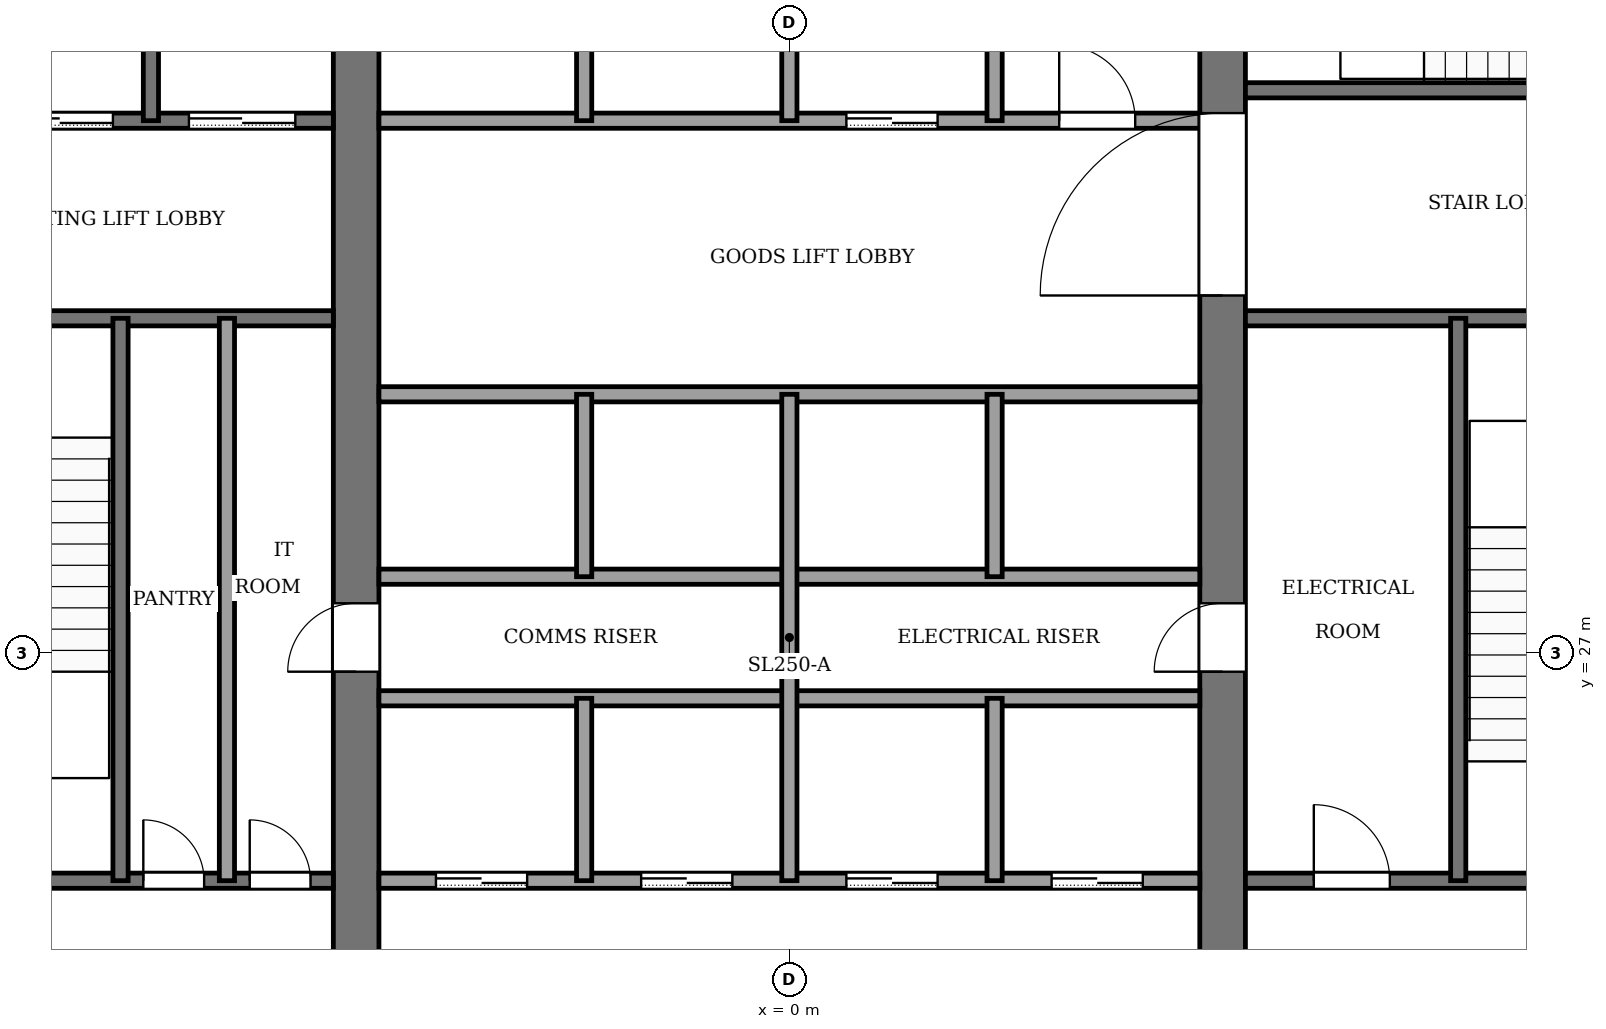
"""IFC4 building model, lengths in metres.
Left out: names, types, materials, properties, quantities, classifications, styles, units other than length and angle.
Written with IfcOpenShell. Run it as: python <this file> out.ifc"""

import sys

from ifc_helpers import new_model, si_unit, direction, frame, frame_2d, origin, place, context, subcontext, project, spatial, rectangle, extrude, element, fill, save


model = new_model("IFC4")
c1 = context("Model", 3, precision=1e-05, world=origin(), true_north=direction((0.0, 1.0)))
c2 = subcontext(c1, "Body", "Model", "MODEL_VIEW")
j1 = project(units=[si_unit("LENGTHUNIT", "METRE"), si_unit("PLANEANGLEUNIT", "RADIAN")], contexts=[c1])
p1 = place(None, origin())
s1 = spatial("IfcSite", under=j1, at=p1, CompositionType="ELEMENT")
p2 = place(p1, origin())
s2 = spatial("IfcBuilding", under=s1, at=p2, CompositionType="ELEMENT")
p3 = place(p2, frame((0.0, 0.0, 22.0)))
s3 = spatial("IfcBuildingStorey", under=s2, at=p3, CompositionType="ELEMENT", Elevation=22.0)
p4 = place(p3, frame((-5.7, 18.4, -0.13), z_axis=(0.0, 0.0, 1.0), x_axis=(0.0, 1.0, 0.0)))
e1 = element("IfcWall", 1, at=p4, inside=s3, PredefinedType="SHEAR", context=c2, shape_type="SweptSolid", body=[
    extrude(rectangle(XDim=19.2, YDim=0.6, at=frame_2d((9.6, 0.0))), origin(), (0.0, 0.0, 1.0), 4.0),
])
p5 = place(p4, frame((8.35, 0.0, 0.13)))
e2 = element("IfcOpeningElement", 2, at=p5, cuts=e1, PredefinedType="OPENING", context=c2, shape_type="SweptSolid", body=[
    extrude(rectangle(XDim=0.9, YDim=2.1, at=frame_2d((0.45, 1.05))), frame((0.0, 0.31, 0.0), z_axis=(0.0, -1.0, 0.0), x_axis=(1.0, 0.0, 0.0)), (0.0, 0.0, 1.0), 0.62),
])
p6 = place(p3, frame((5.7, 18.4, -0.13), z_axis=(0.0, 0.0, 1.0), x_axis=(0.0, 1.0, 0.0)))
e3 = element("IfcWall", 3, at=p6, inside=s3, PredefinedType="SHEAR", context=c2, shape_type="SweptSolid", body=[
    extrude(rectangle(XDim=19.2, YDim=0.6, at=frame_2d((9.6, 0.0))), origin(), (0.0, 0.0, 1.0), 4.0),
])
p7 = place(p6, frame((8.35, 0.0, 0.13)))
e4 = element("IfcOpeningElement", 4, at=p7, cuts=e3, PredefinedType="OPENING", context=c2, shape_type="SweptSolid", body=[
    extrude(rectangle(XDim=0.9, YDim=2.1, at=frame_2d((0.45, 1.05))), frame((0.0, 0.31, 0.0), z_axis=(0.0, -1.0, 0.0), x_axis=(1.0, 0.0, 0.0)), (0.0, 0.0, 1.0), 0.62),
])
p8 = place(p6, frame((13.3, 0.0, 0.13)))
e5 = element("IfcOpeningElement", 5, at=p8, cuts=e3, PredefinedType="OPENING", context=c2, shape_type="SweptSolid", body=[
    extrude(rectangle(XDim=2.4, YDim=2.4, at=frame_2d((1.2, 1.2))), frame((0.0, 0.31, 0.0), z_axis=(0.0, -1.0, 0.0), x_axis=(1.0, 0.0, 0.0)), (0.0, 0.0, 1.0), 0.62),
])
p9 = place(p3, frame((-12.6, 24.0, 0.0), z_axis=(0.0, 0.0, 1.0), x_axis=(1.0, 0.0, 0.0)))
e6 = element("IfcWall", 6, at=p9, inside=s3, PredefinedType="PARTITIONING", context=c2, shape_type="SweptSolid", body=[
    extrude(rectangle(XDim=6.6, YDim=0.2, at=frame_2d((3.3, 0.0))), origin(), (0.0, 0.0, 1.0), 3.87),
])
p10 = place(p9, frame((4.1, 0.0, 0.0)))
e7 = element("IfcOpeningElement", 7, at=p10, cuts=e6, PredefinedType="OPENING", context=c2, shape_type="SweptSolid", body=[
    extrude(rectangle(XDim=0.8, YDim=2.1, at=frame_2d((0.4, 1.05))), frame((0.0, 0.11, 0.0), z_axis=(0.0, -1.0, 0.0), x_axis=(1.0, 0.0, 0.0)), (0.0, 0.0, 1.0), 0.22),
])
p11 = place(p9, frame((5.5, 0.0, 0.0)))
e8 = element("IfcOpeningElement", 8, at=p11, cuts=e6, PredefinedType="OPENING", context=c2, shape_type="SweptSolid", body=[
    extrude(rectangle(XDim=0.8, YDim=2.1, at=frame_2d((0.4, 1.05))), frame((0.0, 0.11, 0.0), z_axis=(0.0, -1.0, 0.0), x_axis=(1.0, 0.0, 0.0)), (0.0, 0.0, 1.0), 0.22),
])
p12 = place(p3, frame((-5.4, 24.0, 0.0), z_axis=(0.0, 0.0, 1.0), x_axis=(1.0, 0.0, 0.0)))
e9 = element("IfcWall", 9, at=p12, inside=s3, PredefinedType="PARTITIONING", context=c2, shape_type="SweptSolid", body=[
    extrude(rectangle(XDim=10.8, YDim=0.2, at=frame_2d((5.4, 0.0))), origin(), (0.0, 0.0, 1.0), 3.87),
])
p13 = place(p12, frame((0.75, 0.0, 0.0)))
e10 = element("IfcOpeningElement", 10, at=p13, cuts=e9, PredefinedType="OPENING", context=c2, shape_type="SweptSolid", body=[
    extrude(rectangle(XDim=1.2, YDim=2.2, at=frame_2d((0.6, 1.1))), frame((0.0, 0.11, 0.0), z_axis=(0.0, -1.0, 0.0), x_axis=(1.0, 0.0, 0.0)), (0.0, 0.0, 1.0), 0.22),
])
p14 = place(p12, frame((3.45, 0.0, 0.0)))
e11 = element("IfcOpeningElement", 11, at=p14, cuts=e9, PredefinedType="OPENING", context=c2, shape_type="SweptSolid", body=[
    extrude(rectangle(XDim=1.2, YDim=2.2, at=frame_2d((0.6, 1.1))), frame((0.0, 0.11, 0.0), z_axis=(0.0, -1.0, 0.0), x_axis=(1.0, 0.0, 0.0)), (0.0, 0.0, 1.0), 0.22),
])
p15 = place(p12, frame((6.15, 0.0, 0.0)))
e12 = element("IfcOpeningElement", 12, at=p15, cuts=e9, PredefinedType="OPENING", context=c2, shape_type="SweptSolid", body=[
    extrude(rectangle(XDim=1.2, YDim=2.2, at=frame_2d((0.6, 1.1))), frame((0.0, 0.11, 0.0), z_axis=(0.0, -1.0, 0.0), x_axis=(1.0, 0.0, 0.0)), (0.0, 0.0, 1.0), 0.22),
])
p16 = place(p12, frame((8.85, 0.0, 0.0)))
e13 = element("IfcOpeningElement", 13, at=p16, cuts=e9, PredefinedType="OPENING", context=c2, shape_type="SweptSolid", body=[
    extrude(rectangle(XDim=1.2, YDim=2.2, at=frame_2d((0.6, 1.1))), frame((0.0, 0.11, 0.0), z_axis=(0.0, -1.0, 0.0), x_axis=(1.0, 0.0, 0.0)), (0.0, 0.0, 1.0), 0.22),
])
p17 = place(p3, frame((6.0, 24.0, 0.0), z_axis=(0.0, 0.0, 1.0), x_axis=(1.0, 0.0, 0.0)))
e14 = element("IfcWall", 14, at=p17, inside=s3, PredefinedType="PARTITIONING", context=c2, shape_type="SweptSolid", body=[
    extrude(rectangle(XDim=6.6, YDim=0.2, at=frame_2d((3.3, 0.0))), origin(), (0.0, 0.0, 1.0), 3.87),
])
p18 = place(p17, frame((0.9, 0.0, 0.0)))
e15 = element("IfcOpeningElement", 15, at=p18, cuts=e14, PredefinedType="OPENING", context=c2, shape_type="SweptSolid", body=[
    extrude(rectangle(XDim=1.0, YDim=2.1, at=frame_2d((0.5, 1.05))), frame((0.0, 0.11, 0.0), z_axis=(0.0, -1.0, 0.0), x_axis=(1.0, 0.0, 0.0)), (0.0, 0.0, 1.0), 0.22),
])
p19 = place(p17, frame((4.4, 0.0, 0.0)))
e16 = element("IfcOpeningElement", 16, at=p19, cuts=e14, PredefinedType="OPENING", context=c2, shape_type="SweptSolid", body=[
    extrude(rectangle(XDim=1.2, YDim=2.2, at=frame_2d((0.6, 1.1))), frame((0.0, 0.11, 0.0), z_axis=(0.0, -1.0, 0.0), x_axis=(1.0, 0.0, 0.0)), (0.0, 0.0, 1.0), 0.22),
])
for number, where, z_axis, x_axis in (
    (17, (-5.4, 26.4, 0.0), (0.0, 0.0, 1.0), (1.0, 0.0, 0.0)),
    (18, (-5.4, 28.0, 0.0), (0.0, 0.0, 1.0), (1.0, 0.0, 0.0)),
    (19, (-5.4, 30.4, 0.0), (0.0, 0.0, 1.0), (1.0, 0.0, 0.0)),
):
    element("IfcWall", number, at=place(p3, frame(where, z_axis=z_axis, x_axis=x_axis)), inside=s3, PredefinedType="PARTITIONING", context=c2, shape_type="SweptSolid", body=[
        extrude(rectangle(XDim=10.8, YDim=0.2, at=frame_2d((5.4, 0.0))), origin(), (0.0, 0.0, 1.0), 3.87),
    ])
p20 = place(p3, frame((-12.6, 31.4, 0.0), z_axis=(0.0, 0.0, 1.0), x_axis=(1.0, 0.0, 0.0)))
e20 = element("IfcWall", 20, at=p20, inside=s3, PredefinedType="PARTITIONING", context=c2, shape_type="SweptSolid", body=[
    extrude(rectangle(XDim=6.6, YDim=0.2, at=frame_2d((3.3, 0.0))), origin(), (0.0, 0.0, 1.0), 3.87),
])
p21 = place(p20, frame((1.0, 0.0, 0.0)))
e21 = element("IfcOpeningElement", 21, at=p21, cuts=e20, PredefinedType="OPENING", context=c2, shape_type="SweptSolid", body=[
    extrude(rectangle(XDim=1.2, YDim=2.2, at=frame_2d((0.6, 1.1))), frame((0.0, 0.11, 0.0), z_axis=(0.0, -1.0, 0.0), x_axis=(1.0, 0.0, 0.0)), (0.0, 0.0, 1.0), 0.22),
])
p22 = place(p3, frame((6.0, 31.4, 0.0), z_axis=(0.0, 0.0, 1.0), x_axis=(1.0, 0.0, 0.0)))
e22 = element("IfcWall", 22, at=p22, inside=s3, PredefinedType="PARTITIONING", context=c2, shape_type="SweptSolid", body=[
    extrude(rectangle(XDim=6.6, YDim=0.2, at=frame_2d((3.3, 0.0))), origin(), (0.0, 0.0, 1.0), 3.87),
])
p23 = place(p3, frame((-12.6, 34.0, 0.0), z_axis=(0.0, 0.0, 1.0), x_axis=(1.0, 0.0, 0.0)))
e23 = element("IfcWall", 23, at=p23, inside=s3, PredefinedType="PARTITIONING", context=c2, shape_type="SweptSolid", body=[
    extrude(rectangle(XDim=6.6, YDim=0.2, at=frame_2d((3.3, 0.0))), origin(), (0.0, 0.0, 1.0), 3.87),
])
p24 = place(p23, frame((4.7, 0.0, 0.0)))
e24 = element("IfcOpeningElement", 24, at=p24, cuts=e23, PredefinedType="OPENING", context=c2, shape_type="SweptSolid", body=[
    extrude(rectangle(XDim=1.4, YDim=2.2, at=frame_2d((0.7, 1.1))), frame((0.0, 0.11, 0.0), z_axis=(0.0, -1.0, 0.0), x_axis=(1.0, 0.0, 0.0)), (0.0, 0.0, 1.0), 0.22),
])
p25 = place(p23, frame((2.3, 0.0, 0.0)))
e25 = element("IfcOpeningElement", 25, at=p25, cuts=e23, PredefinedType="OPENING", context=c2, shape_type="SweptSolid", body=[
    extrude(rectangle(XDim=1.4, YDim=2.2, at=frame_2d((0.7, 1.1))), frame((0.0, 0.11, 0.0), z_axis=(0.0, -1.0, 0.0), x_axis=(1.0, 0.0, 0.0)), (0.0, 0.0, 1.0), 0.22),
])
p26 = place(p23, frame((0.45, 0.0, 0.0)))
e26 = element("IfcOpeningElement", 26, at=p26, cuts=e23, PredefinedType="OPENING", context=c2, shape_type="SweptSolid", body=[
    extrude(rectangle(XDim=0.9, YDim=2.1, at=frame_2d((0.45, 1.05))), frame((0.0, 0.11, 0.0), z_axis=(0.0, -1.0, 0.0), x_axis=(1.0, 0.0, 0.0)), (0.0, 0.0, 1.0), 0.22),
])
p27 = place(p3, frame((-5.4, 34.0, 0.0), z_axis=(0.0, 0.0, 1.0), x_axis=(1.0, 0.0, 0.0)))
e27 = element("IfcWall", 27, at=p27, inside=s3, PredefinedType="PARTITIONING", context=c2, shape_type="SweptSolid", body=[
    extrude(rectangle(XDim=10.8, YDim=0.2, at=frame_2d((5.4, 0.0))), origin(), (0.0, 0.0, 1.0), 3.87),
])
p28 = place(p27, frame((6.15, 0.0, 0.0)))
e28 = element("IfcOpeningElement", 28, at=p28, cuts=e27, PredefinedType="OPENING", context=c2, shape_type="SweptSolid", body=[
    extrude(rectangle(XDim=1.2, YDim=2.2, at=frame_2d((0.6, 1.1))), frame((0.0, 0.11, 0.0), z_axis=(0.0, -1.0, 0.0), x_axis=(1.0, 0.0, 0.0)), (0.0, 0.0, 1.0), 0.22),
])
p29 = place(p27, frame((8.95, 0.0, 0.0)))
e29 = element("IfcOpeningElement", 29, at=p29, cuts=e27, PredefinedType="OPENING", context=c2, shape_type="SweptSolid", body=[
    extrude(rectangle(XDim=1.0, YDim=2.1, at=frame_2d((0.5, 1.05))), frame((0.0, 0.11, 0.0), z_axis=(0.0, -1.0, 0.0), x_axis=(1.0, 0.0, 0.0)), (0.0, 0.0, 1.0), 0.22),
])
p30 = place(p3, frame((6.0, 34.4, 0.0), z_axis=(0.0, 0.0, 1.0), x_axis=(1.0, 0.0, 0.0)))
e30 = element("IfcWall", 30, at=p30, inside=s3, PredefinedType="PARTITIONING", context=c2, shape_type="SweptSolid", body=[
    extrude(rectangle(XDim=6.6, YDim=0.2, at=frame_2d((3.3, 0.0))), origin(), (0.0, 0.0, 1.0), 3.87),
])
p31 = place(p30, frame((4.8, 0.0, 0.0)))
e31 = element("IfcOpeningElement", 31, at=p31, cuts=e30, PredefinedType="OPENING", context=c2, shape_type="SweptSolid", body=[
    extrude(rectangle(XDim=1.2, YDim=2.2, at=frame_2d((0.6, 1.1))), frame((0.0, 0.11, 0.0), z_axis=(0.0, -1.0, 0.0), x_axis=(1.0, 0.0, 0.0)), (0.0, 0.0, 1.0), 0.22),
])
p32 = place(p3, frame((-8.8, 24.0, 0.0), z_axis=(0.0, 0.0, 1.0), x_axis=(0.0, 1.0, 0.0)))
e32 = element("IfcWall", 32, at=p32, inside=s3, PredefinedType="PARTITIONING", context=c2, shape_type="SweptSolid", body=[
    extrude(rectangle(XDim=7.4, YDim=0.2, at=frame_2d((3.7, 0.0))), origin(), (0.0, 0.0, 1.0), 3.87),
])
p33 = place(p3, frame((-8.4, 34.0, 0.0), z_axis=(0.0, 0.0, 1.0), x_axis=(0.0, 1.0, 0.0)))
e33 = element("IfcWall", 33, at=p33, inside=s3, PredefinedType="PARTITIONING", context=c2, shape_type="SweptSolid", body=[
    extrude(rectangle(XDim=3.6, YDim=0.2, at=frame_2d((1.8, 0.0))), origin(), (0.0, 0.0, 1.0), 3.87),
])
p34 = place(p3, frame((-7.4, 24.0, 0.0), z_axis=(0.0, 0.0, 1.0), x_axis=(0.0, 1.0, 0.0)))
e34 = element("IfcWall", 34, at=p34, inside=s3, PredefinedType="PARTITIONING", context=c2, shape_type="SweptSolid", body=[
    extrude(rectangle(XDim=7.4, YDim=0.2, at=frame_2d((3.7, 0.0))), origin(), (0.0, 0.0, 1.0), 3.87),
])
for number, where, z_axis, x_axis in (
    (35, (-2.7, 24.0, 0.0), (0.0, 0.0, 1.0), (0.0, 1.0, 0.0)),
    (36, (-2.7, 28.0, 0.0), (0.0, 0.0, 1.0), (0.0, 1.0, 0.0)),
):
    element("IfcWall", number, at=place(p3, frame(where, z_axis=z_axis, x_axis=x_axis)), inside=s3, PredefinedType="PARTITIONING", context=c2, shape_type="SweptSolid", body=[
        extrude(rectangle(XDim=2.4, YDim=0.2, at=frame_2d((1.2, 0.0))), origin(), (0.0, 0.0, 1.0), 3.87),
    ])
p35 = place(p3, frame((-2.7, 34.0, 0.0), z_axis=(0.0, 0.0, 1.0), x_axis=(0.0, 1.0, 0.0)))
e37 = element("IfcWall", 37, at=p35, inside=s3, PredefinedType="PARTITIONING", context=c2, shape_type="SweptSolid", body=[
    extrude(rectangle(XDim=3.6, YDim=0.2, at=frame_2d((1.8, 0.0))), origin(), (0.0, 0.0, 1.0), 3.87),
])
p36 = place(p3, frame((0.0, 24.0, 0.0), z_axis=(0.0, 0.0, 1.0), x_axis=(0.0, 1.0, 0.0)))
e38 = element("IfcWall", 38, at=p36, inside=s3, PredefinedType="PARTITIONING", context=c2, shape_type="SweptSolid", body=[
    extrude(rectangle(XDim=6.4, YDim=0.2, at=frame_2d((3.2, 0.0))), origin(), (0.0, 0.0, 1.0), 3.87),
])
p37 = place(p3, frame((0.0, 34.0, 0.0), z_axis=(0.0, 0.0, 1.0), x_axis=(0.0, 1.0, 0.0)))
e39 = element("IfcWall", 39, at=p37, inside=s3, PredefinedType="PARTITIONING", context=c2, shape_type="SweptSolid", body=[
    extrude(rectangle(XDim=3.6, YDim=0.2, at=frame_2d((1.8, 0.0))), origin(), (0.0, 0.0, 1.0), 3.87),
])
for number, where, z_axis, x_axis in (
    (40, (2.7, 24.0, 0.0), (0.0, 0.0, 1.0), (0.0, 1.0, 0.0)),
    (41, (2.7, 28.0, 0.0), (0.0, 0.0, 1.0), (0.0, 1.0, 0.0)),
):
    element("IfcWall", number, at=place(p3, frame(where, z_axis=z_axis, x_axis=x_axis)), inside=s3, PredefinedType="PARTITIONING", context=c2, shape_type="SweptSolid", body=[
        extrude(rectangle(XDim=2.4, YDim=0.2, at=frame_2d((1.2, 0.0))), origin(), (0.0, 0.0, 1.0), 3.87),
    ])
p38 = place(p3, frame((2.7, 34.0, 0.0), z_axis=(0.0, 0.0, 1.0), x_axis=(0.0, 1.0, 0.0)))
e42 = element("IfcWall", 42, at=p38, inside=s3, PredefinedType="PARTITIONING", context=c2, shape_type="SweptSolid", body=[
    extrude(rectangle(XDim=3.6, YDim=0.2, at=frame_2d((1.8, 0.0))), origin(), (0.0, 0.0, 1.0), 3.87),
])
p39 = place(p3, frame((8.8, 24.0, 0.0), z_axis=(0.0, 0.0, 1.0), x_axis=(0.0, 1.0, 0.0)))
e43 = element("IfcWall", 43, at=p39, inside=s3, PredefinedType="PARTITIONING", context=c2, shape_type="SweptSolid", body=[
    extrude(rectangle(XDim=7.4, YDim=0.2, at=frame_2d((3.7, 0.0))), origin(), (0.0, 0.0, 1.0), 3.87),
])
p40 = place(p13, origin())
e44 = element("IfcDoor", 44, at=p40, inside=s3, OperationType="SLIDING_TO_LEFT", PredefinedType="DOOR", context=c2, shape_type="SweptSolid", body=[
    extrude(rectangle(XDim=1.2, YDim=2.2, at=frame_2d((0.6, 1.1))), frame((0.0, 0.025, 0.0), z_axis=(0.0, -1.0, 0.0), x_axis=(1.0, 0.0, 0.0)), (0.0, 0.0, 1.0), 0.05),
])
fill(e10, e44)
p41 = place(p14, origin())
e45 = element("IfcDoor", 45, at=p41, inside=s3, OperationType="SLIDING_TO_LEFT", PredefinedType="DOOR", context=c2, shape_type="SweptSolid", body=[
    extrude(rectangle(XDim=1.2, YDim=2.2, at=frame_2d((0.6, 1.1))), frame((0.0, 0.025, 0.0), z_axis=(0.0, -1.0, 0.0), x_axis=(1.0, 0.0, 0.0)), (0.0, 0.0, 1.0), 0.05),
])
fill(e11, e45)
p42 = place(p15, origin())
e46 = element("IfcDoor", 46, at=p42, inside=s3, OperationType="SLIDING_TO_LEFT", PredefinedType="DOOR", context=c2, shape_type="SweptSolid", body=[
    extrude(rectangle(XDim=1.2, YDim=2.2, at=frame_2d((0.6, 1.1))), frame((0.0, 0.025, 0.0), z_axis=(0.0, -1.0, 0.0), x_axis=(1.0, 0.0, 0.0)), (0.0, 0.0, 1.0), 0.05),
])
fill(e12, e46)
p43 = place(p16, origin())
e47 = element("IfcDoor", 47, at=p43, inside=s3, OperationType="SLIDING_TO_LEFT", PredefinedType="DOOR", context=c2, shape_type="SweptSolid", body=[
    extrude(rectangle(XDim=1.2, YDim=2.2, at=frame_2d((0.6, 1.1))), frame((0.0, 0.025, 0.0), z_axis=(0.0, -1.0, 0.0), x_axis=(1.0, 0.0, 0.0)), (0.0, 0.0, 1.0), 0.05),
])
fill(e13, e47)
p44 = place(p28, origin())
e48 = element("IfcDoor", 48, at=p44, inside=s3, OperationType="SLIDING_TO_LEFT", PredefinedType="DOOR", context=c2, shape_type="SweptSolid", body=[
    extrude(rectangle(XDim=1.2, YDim=2.2, at=frame_2d((0.6, 1.1))), frame((0.0, 0.025, 0.0), z_axis=(0.0, -1.0, 0.0), x_axis=(1.0, 0.0, 0.0)), (0.0, 0.0, 1.0), 0.05),
])
fill(e28, e48)
p45 = place(p24, origin())
e49 = element("IfcDoor", 49, at=p45, inside=s3, OperationType="SLIDING_TO_LEFT", PredefinedType="DOOR", context=c2, shape_type="SweptSolid", body=[
    extrude(rectangle(XDim=1.4, YDim=2.2, at=frame_2d((0.7, 1.1))), frame((0.0, 0.025, 0.0), z_axis=(0.0, -1.0, 0.0), x_axis=(1.0, 0.0, 0.0)), (0.0, 0.0, 1.0), 0.05),
])
fill(e24, e49)
p46 = place(p25, origin())
e50 = element("IfcDoor", 50, at=p46, inside=s3, OperationType="SLIDING_TO_LEFT", PredefinedType="DOOR", context=c2, shape_type="SweptSolid", body=[
    extrude(rectangle(XDim=1.4, YDim=2.2, at=frame_2d((0.7, 1.1))), frame((0.0, 0.025, 0.0), z_axis=(0.0, -1.0, 0.0), x_axis=(1.0, 0.0, 0.0)), (0.0, 0.0, 1.0), 0.05),
])
fill(e25, e50)
p47 = place(p10, origin())
e51 = element("IfcDoor", 51, at=p47, inside=s3, OperationType="SINGLE_SWING_LEFT", PredefinedType="DOOR", context=c2, shape_type="SweptSolid", body=[
    extrude(rectangle(XDim=0.8, YDim=2.1, at=frame_2d((0.4, 1.05))), frame((0.0, 0.025, 0.0), z_axis=(0.0, -1.0, 0.0), x_axis=(1.0, 0.0, 0.0)), (0.0, 0.0, 1.0), 0.05),
])
fill(e7, e51)
p48 = place(p11, origin())
e52 = element("IfcDoor", 52, at=p48, inside=s3, OperationType="SINGLE_SWING_RIGHT", PredefinedType="DOOR", context=c2, shape_type="SweptSolid", body=[
    extrude(rectangle(XDim=0.8, YDim=2.1, at=frame_2d((0.4, 1.05))), frame((0.0, 0.025, 0.0), z_axis=(0.0, -1.0, 0.0), x_axis=(1.0, 0.0, 0.0)), (0.0, 0.0, 1.0), 0.05),
])
fill(e8, e52)
p49 = place(p18, origin())
e53 = element("IfcDoor", 53, at=p49, inside=s3, OperationType="SINGLE_SWING_RIGHT", PredefinedType="DOOR", context=c2, shape_type="SweptSolid", body=[
    extrude(rectangle(XDim=1.0, YDim=2.1, at=frame_2d((0.5, 1.05))), frame((0.0, 0.025, 0.0), z_axis=(0.0, -1.0, 0.0), x_axis=(1.0, 0.0, 0.0)), (0.0, 0.0, 1.0), 0.05),
])
fill(e15, e53)
p50 = place(p29, origin())
e54 = element("IfcDoor", 54, at=p50, inside=s3, OperationType="SINGLE_SWING_LEFT", PredefinedType="DOOR", context=c2, shape_type="SweptSolid", body=[
    extrude(rectangle(XDim=1.0, YDim=2.1, at=frame_2d((0.5, 1.05))), frame((0.0, 0.025, 0.0), z_axis=(0.0, -1.0, 0.0), x_axis=(1.0, 0.0, 0.0)), (0.0, 0.0, 1.0), 0.05),
])
fill(e29, e54)
p51 = place(p5, origin())
e55 = element("IfcDoor", 55, at=p51, inside=s3, OperationType="SINGLE_SWING_LEFT", PredefinedType="DOOR", context=c2, shape_type="SweptSolid", body=[
    extrude(rectangle(XDim=0.9, YDim=2.1, at=frame_2d((0.45, 1.05))), frame((0.0, 0.025, 0.0), z_axis=(0.0, -1.0, 0.0), x_axis=(1.0, 0.0, 0.0)), (0.0, 0.0, 1.0), 0.05),
])
fill(e2, e55)
p52 = place(p7, origin())
e56 = element("IfcDoor", 56, at=p52, inside=s3, OperationType="SINGLE_SWING_RIGHT", PredefinedType="DOOR", context=c2, shape_type="SweptSolid", body=[
    extrude(rectangle(XDim=0.9, YDim=2.1, at=frame_2d((0.45, 1.05))), frame((0.0, 0.025, 0.0), z_axis=(0.0, -1.0, 0.0), x_axis=(1.0, 0.0, 0.0)), (0.0, 0.0, 1.0), 0.05),
])
fill(e4, e56)
p53 = place(p8, origin())
e57 = element("IfcDoor", 57, at=p53, inside=s3, OperationType="DOUBLE_DOOR_SINGLE_SWING", PredefinedType="DOOR", context=c2, shape_type="SweptSolid", body=[
    extrude(rectangle(XDim=2.4, YDim=2.4, at=frame_2d((1.2, 1.2))), frame((0.0, 0.025, 0.0), z_axis=(0.0, -1.0, 0.0), x_axis=(1.0, 0.0, 0.0)), (0.0, 0.0, 1.0), 0.05),
])
fill(e5, e57)
save(model, sys.argv[1])
